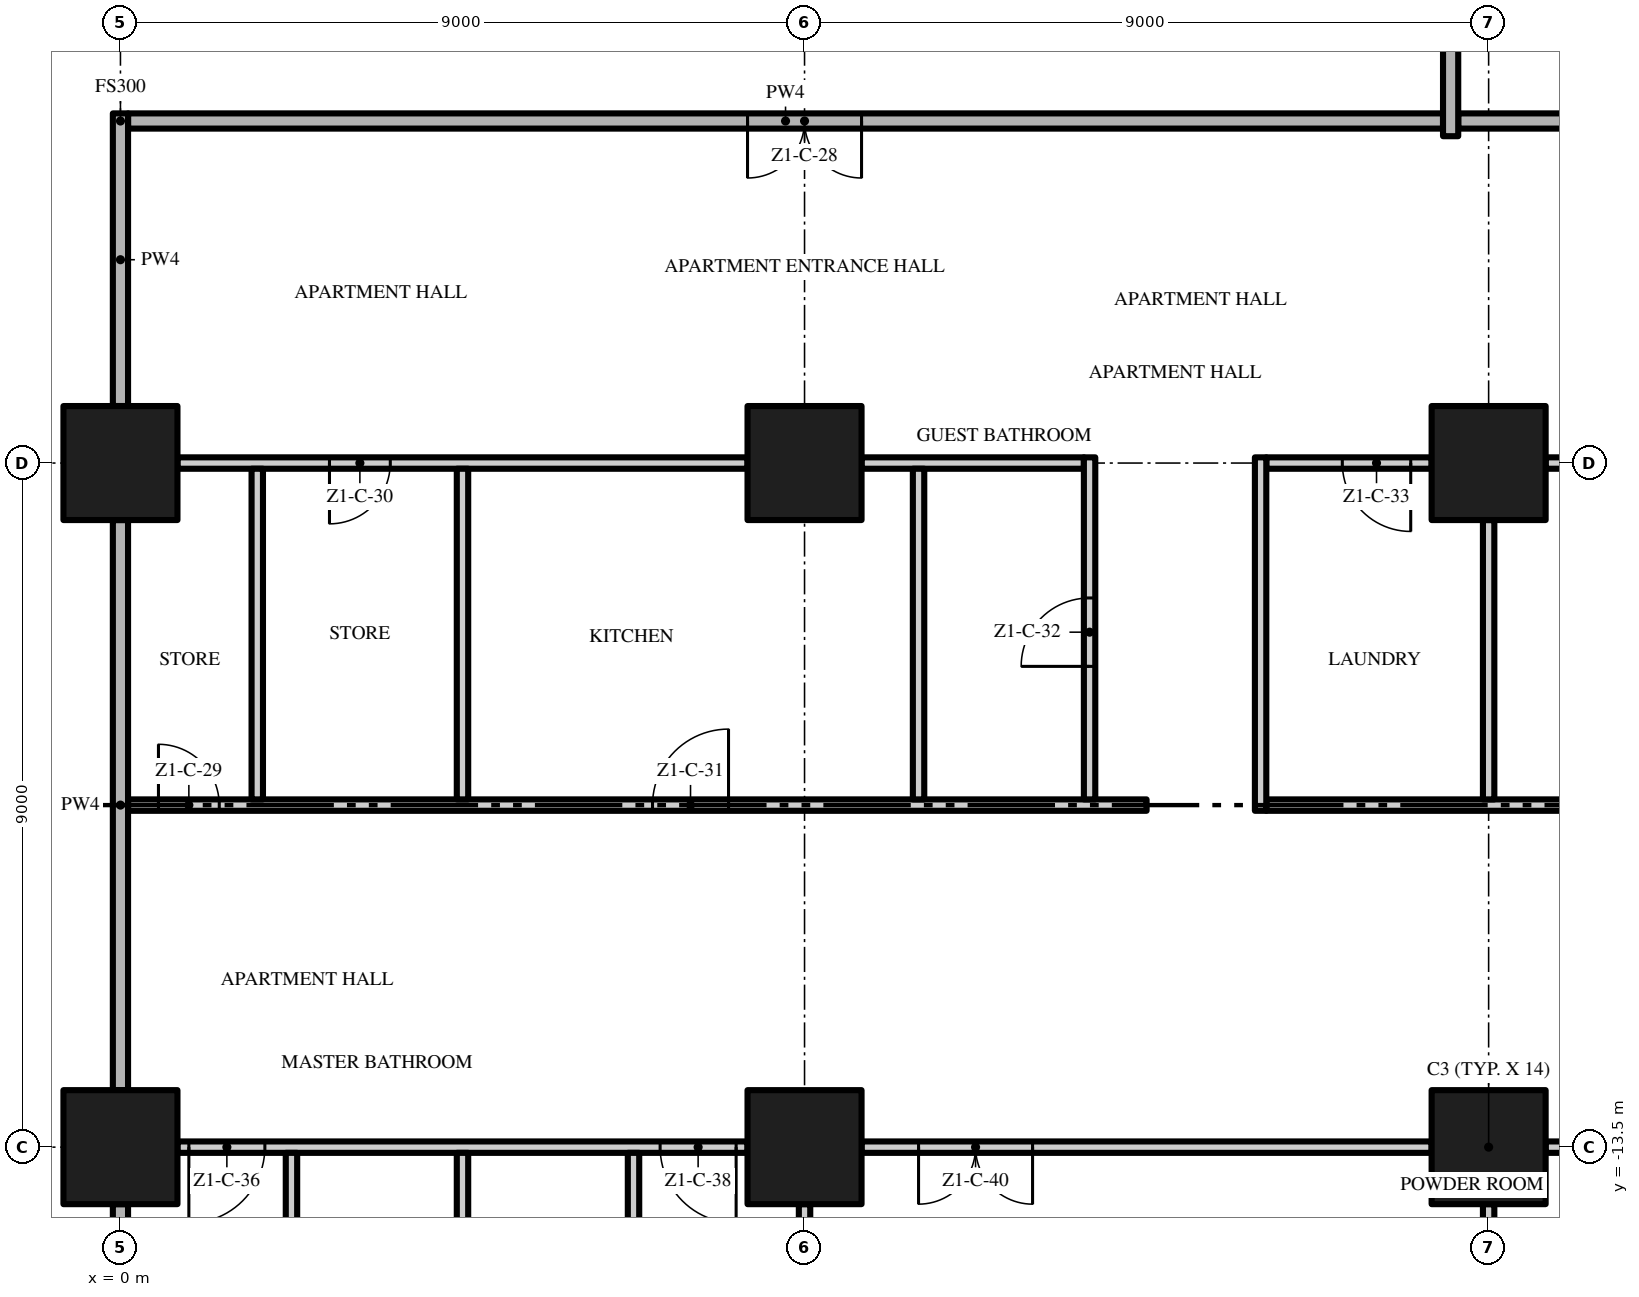
"""IFC4 building model, lengths in metres.
Left out: names, types, materials, properties, quantities, classifications, styles, units other than length and angle.
Written with IfcOpenShell. Run it as: python <this file> out.ifc"""

import sys

from ifc_helpers import new_model, si_unit, direction, frame, frame_2d, origin, origin_2d, place, context, subcontext, project, spatial, rectangle, extrude, element, fill, save


model = new_model("IFC4")
c1 = context("Model", 3, precision=1e-05, world=origin(), true_north=direction((0.0, 1.0)))
c2 = subcontext(c1, "Body", "Model", "MODEL_VIEW")
j1 = project(units=[si_unit("LENGTHUNIT", "METRE"), si_unit("PLANEANGLEUNIT", "RADIAN")], contexts=[c1])
p1 = place(None, origin())
s1 = spatial("IfcSite", under=j1, at=p1, CompositionType="ELEMENT")
p2 = place(p1, origin())
s2 = spatial("IfcBuilding", under=s1, at=p2, CompositionType="ELEMENT")
p3 = place(p2, frame((0.0, 0.0, 41.6)))
s3 = spatial("IfcBuildingStorey", under=s2, at=p3, CompositionType="ELEMENT", Elevation=41.6)
for number, where, z_axis, x_axis in (
    (1, (0.0, -13.5, 0.0), (0.0, 0.0, 1.0), (1.0, 0.0, 0.0)),
    (2, (0.0, -4.5, 0.0), (0.0, 0.0, 1.0), (1.0, 0.0, 0.0)),
    (3, (18.0, -13.5, 0.0), (0.0, 0.0, 1.0), (1.0, 0.0, 0.0)),
    (4, (18.0, -4.5, 0.0), (0.0, 0.0, 1.0), (1.0, 0.0, 0.0)),
    (5, (9.0, -13.5, 0.0), (0.0, 0.0, 1.0), (1.0, 0.0, 0.0)),
    (6, (9.0, -4.5, 0.0), (0.0, 0.0, 1.0), (1.0, 0.0, 0.0)),
):
    element("IfcColumn", number, at=place(p3, frame(where, z_axis=z_axis, x_axis=x_axis)), inside=s3, PredefinedType="COLUMN", context=c2, shape_type="SweptSolid", body=[
        extrude(rectangle(XDim=1.5, YDim=1.5, at=origin_2d()), origin(), (0.0, 0.0, 1.0), 3.5),
    ])
p4 = place(p3, frame((8.25, -13.5, 0.0), z_axis=(0.0, 0.0, 1.0), x_axis=(-1.0, 0.0, 0.0)))
e7 = element("IfcWall", 7, at=p4, inside=s3, PredefinedType="PARTITIONING", context=c2, shape_type="SweptSolid", body=[
    extrude(rectangle(XDim=7.5, YDim=0.15, at=frame_2d((3.75, 0.0))), origin(), (0.0, 0.0, 1.0), 3.5),
])
p5 = place(p4, frame((6.35, 0.0, 0.0)))
e8 = element("IfcOpeningElement", 8, at=p5, cuts=e7, PredefinedType="OPENING", context=c2, shape_type="SweptSolid", body=[
    extrude(rectangle(XDim=1.0, YDim=2.4, at=frame_2d((0.5, 1.2))), frame((0.0, 0.085, 0.0), z_axis=(0.0, -1.0, 0.0), x_axis=(1.0, 0.0, 0.0)), (0.0, 0.0, 1.0), 0.17),
])
p6 = place(p4, frame((0.15, 0.0, 0.0)))
e9 = element("IfcOpeningElement", 9, at=p6, cuts=e7, PredefinedType="OPENING", context=c2, shape_type="SweptSolid", body=[
    extrude(rectangle(XDim=1.0, YDim=2.4, at=frame_2d((0.5, 1.2))), frame((0.0, 0.085, 0.0), z_axis=(0.0, -1.0, 0.0), x_axis=(1.0, 0.0, 0.0)), (0.0, 0.0, 1.0), 0.17),
])
p7 = place(p3, frame((17.25, -13.5, 0.0), z_axis=(0.0, 0.0, 1.0), x_axis=(-1.0, 0.0, 0.0)))
e10 = element("IfcWall", 10, at=p7, inside=s3, PredefinedType="PARTITIONING", context=c2, shape_type="SweptSolid", body=[
    extrude(rectangle(XDim=7.5, YDim=0.15, at=frame_2d((3.75, 0.0))), origin(), (0.0, 0.0, 1.0), 3.5),
])
p8 = place(p7, frame((5.25, 0.0, 0.0)))
e11 = element("IfcOpeningElement", 11, at=p8, cuts=e10, PredefinedType="OPENING", context=c2, shape_type="SweptSolid", body=[
    extrude(rectangle(XDim=1.5, YDim=2.4, at=frame_2d((0.75, 1.2))), frame((0.0, 0.085, 0.0), z_axis=(0.0, -1.0, 0.0), x_axis=(1.0, 0.0, 0.0)), (0.0, 0.0, 1.0), 0.17),
])
p9 = place(p3, frame((25.6, -13.5, 0.0), z_axis=(0.0, 0.0, 1.0), x_axis=(-1.0, 0.0, 0.0)))
e12 = element("IfcWall", 12, at=p9, inside=s3, PredefinedType="PARTITIONING", context=c2, shape_type="SweptSolid", body=[
    extrude(rectangle(XDim=6.85, YDim=0.15, at=frame_2d((3.425, 0.0))), origin(), (0.0, 0.0, 1.0), 3.5),
])
p10 = place(p9, frame((1.1, 0.0, 0.0)))
e13 = element("IfcOpeningElement", 13, at=p10, cuts=e12, PredefinedType="OPENING", context=c2, shape_type="SweptSolid", body=[
    extrude(rectangle(XDim=1.8, YDim=2.4, at=frame_2d((0.9, 1.2))), frame((0.0, 0.085, 0.0), z_axis=(0.0, -1.0, 0.0), x_axis=(1.0, 0.0, 0.0)), (0.0, 0.0, 1.0), 0.17),
])
p11 = place(p3, frame((0.1, -9.0, 0.0), z_axis=(0.0, 0.0, 1.0), x_axis=(1.0, 0.0, 0.0)))
e14 = element("IfcWall", 14, at=p11, inside=s3, PredefinedType="PARTITIONING", context=c2, shape_type="SweptSolid", body=[
    extrude(rectangle(XDim=13.4, YDim=0.15, at=frame_2d((6.7, 0.0))), origin(), (0.0, 0.0, 1.0), 3.5),
])
p12 = place(p11, frame((0.4, 0.0, 0.0)))
e15 = element("IfcOpeningElement", 15, at=p12, cuts=e14, PredefinedType="OPENING", context=c2, shape_type="SweptSolid", body=[
    extrude(rectangle(XDim=0.8, YDim=2.0, at=frame_2d((0.4, 1.0))), frame((0.0, 0.085, 0.0), z_axis=(0.0, -1.0, 0.0), x_axis=(1.0, 0.0, 0.0)), (0.0, 0.0, 1.0), 0.17),
])
p13 = place(p11, frame((6.9, 0.0, 0.0)))
e16 = element("IfcOpeningElement", 16, at=p13, cuts=e14, PredefinedType="OPENING", context=c2, shape_type="SweptSolid", body=[
    extrude(rectangle(XDim=1.0, YDim=2.4, at=frame_2d((0.5, 1.2))), frame((0.0, 0.085, 0.0), z_axis=(0.0, -1.0, 0.0), x_axis=(1.0, 0.0, 0.0)), (0.0, 0.0, 1.0), 0.17),
])
p14 = place(p3, frame((15.075, -9.0, 0.0), z_axis=(0.0, 0.0, 1.0), x_axis=(1.0, 0.0, 0.0)))
e17 = element("IfcWall", 17, at=p14, inside=s3, PredefinedType="PARTITIONING", context=c2, shape_type="SweptSolid", body=[
    extrude(rectangle(XDim=11.625, YDim=0.15, at=frame_2d((5.812, 0.0))), origin(), (0.0, 0.0, 1.0), 3.5),
])
p15 = place(p3, frame((8.25, -4.5, 0.0), z_axis=(0.0, 0.0, 1.0), x_axis=(-1.0, 0.0, 0.0)))
e18 = element("IfcWall", 18, at=p15, inside=s3, PredefinedType="PARTITIONING", context=c2, shape_type="SweptSolid", body=[
    extrude(rectangle(XDim=7.5, YDim=0.15, at=frame_2d((3.75, 0.0))), origin(), (0.0, 0.0, 1.0), 3.5),
])
p16 = place(p15, frame((4.7, 0.0, 0.0)))
e19 = element("IfcOpeningElement", 19, at=p16, cuts=e18, PredefinedType="OPENING", context=c2, shape_type="SweptSolid", body=[
    extrude(rectangle(XDim=0.8, YDim=2.0, at=frame_2d((0.4, 1.0))), frame((0.0, 0.085, 0.0), z_axis=(0.0, -1.0, 0.0), x_axis=(1.0, 0.0, 0.0)), (0.0, 0.0, 1.0), 0.17),
])
p17 = place(p3, frame((9.75, -4.5, 0.0), z_axis=(0.0, 0.0, 1.0), x_axis=(1.0, 0.0, 0.0)))
e20 = element("IfcWall", 20, at=p17, inside=s3, PredefinedType="PARTITIONING", context=c2, shape_type="SweptSolid", body=[
    extrude(rectangle(XDim=2.925, YDim=0.15, at=frame_2d((1.462, 0.0))), origin(), (0.0, 0.0, 1.0), 3.5),
])
p18 = place(p3, frame((17.25, -4.5, 0.0), z_axis=(0.0, 0.0, 1.0), x_axis=(-1.0, 0.0, 0.0)))
e21 = element("IfcWall", 21, at=p18, inside=s3, PredefinedType="PARTITIONING", context=c2, shape_type="SweptSolid", body=[
    extrude(rectangle(XDim=2.175, YDim=0.15, at=frame_2d((1.087, 0.0))), origin(), (0.0, 0.0, 1.0), 3.5),
])
p19 = place(p18, frame((0.275, 0.0, 0.0)))
e22 = element("IfcOpeningElement", 22, at=p19, cuts=e21, PredefinedType="OPENING", context=c2, shape_type="SweptSolid", body=[
    extrude(rectangle(XDim=0.9, YDim=2.1, at=frame_2d((0.45, 1.05))), frame((0.0, 0.085, 0.0), z_axis=(0.0, -1.0, 0.0), x_axis=(1.0, 0.0, 0.0)), (0.0, 0.0, 1.0), 0.17),
])
p20 = place(p3, frame((25.6, -4.5, 0.0), z_axis=(0.0, 0.0, 1.0), x_axis=(-1.0, 0.0, 0.0)))
e23 = element("IfcWall", 23, at=p20, inside=s3, PredefinedType="PARTITIONING", context=c2, shape_type="SweptSolid", body=[
    extrude(rectangle(XDim=6.85, YDim=0.15, at=frame_2d((3.425, 0.0))), origin(), (0.0, 0.0, 1.0), 3.5),
])
p21 = place(p20, frame((4.55, 0.0, 0.0)))
e24 = element("IfcOpeningElement", 24, at=p21, cuts=e23, PredefinedType="OPENING", context=c2, shape_type="SweptSolid", body=[
    extrude(rectangle(XDim=0.9, YDim=2.1, at=frame_2d((0.45, 1.05))), frame((0.0, 0.085, 0.0), z_axis=(0.0, -1.0, 0.0), x_axis=(1.0, 0.0, 0.0)), (0.0, 0.0, 1.0), 0.17),
])
p22 = place(p3, frame((17.4, 0.0, 0.0), z_axis=(0.0, 0.0, 1.0), x_axis=(-1.0, 0.0, 0.0)))
e25 = element("IfcWall", 25, at=p22, inside=s3, PredefinedType="PARTITIONING", context=c2, shape_type="SweptSolid", body=[
    extrude(rectangle(XDim=17.3, YDim=0.2, at=frame_2d((8.65, 0.0))), origin(), (0.0, 0.0, 1.0), 3.5),
])
p23 = place(p22, frame((7.65, 0.0, 0.0)))
e26 = element("IfcOpeningElement", 26, at=p23, cuts=e25, PredefinedType="OPENING", context=c2, shape_type="SweptSolid", body=[
    extrude(rectangle(XDim=1.5, YDim=2.4, at=frame_2d((0.75, 1.2))), frame((0.0, 0.11, 0.0), z_axis=(0.0, -1.0, 0.0), x_axis=(1.0, 0.0, 0.0)), (0.0, 0.0, 1.0), 0.22),
])
p24 = place(p3, frame((17.6, 0.0, 0.0), z_axis=(0.0, 0.0, 1.0), x_axis=(1.0, 0.0, 0.0)))
e27 = element("IfcWall", 27, at=p24, inside=s3, PredefinedType="PARTITIONING", context=c2, shape_type="SweptSolid", body=[
    extrude(rectangle(XDim=9.1, YDim=0.2, at=frame_2d((4.55, 0.0))), origin(), (0.0, 0.0, 1.0), 3.5),
])
p25 = place(p3, frame((0.0, -21.1, 0.0), z_axis=(0.0, 0.0, 1.0), x_axis=(0.0, 1.0, 0.0)))
e28 = element("IfcWall", 28, at=p25, inside=s3, PredefinedType="PARTITIONING", context=c2, shape_type="SweptSolid", body=[
    extrude(rectangle(XDim=6.85, YDim=0.2, at=frame_2d((3.425, 0.0))), origin(), (0.0, 0.0, 1.0), 3.5),
])
p26 = place(p3, frame((0.0, -12.75, 0.0), z_axis=(0.0, 0.0, 1.0), x_axis=(0.0, 1.0, 0.0)))
e29 = element("IfcWall", 29, at=p26, inside=s3, PredefinedType="PARTITIONING", context=c2, shape_type="SweptSolid", body=[
    extrude(rectangle(XDim=7.5, YDim=0.2, at=frame_2d((3.75, 0.0))), origin(), (0.0, 0.0, 1.0), 3.5),
])
p27 = place(p3, frame((0.0, -3.75, 0.0), z_axis=(0.0, 0.0, 1.0), x_axis=(0.0, 1.0, 0.0)))
e30 = element("IfcWall", 30, at=p27, inside=s3, PredefinedType="PARTITIONING", context=c2, shape_type="SweptSolid", body=[
    extrude(rectangle(XDim=3.85, YDim=0.2, at=frame_2d((1.925, 0.0))), origin(), (0.0, 0.0, 1.0), 3.5),
])
p28 = place(p3, frame((1.8, -8.925, 0.0), z_axis=(0.0, 0.0, 1.0), x_axis=(0.0, 1.0, 0.0)))
e31 = element("IfcWall", 31, at=p28, inside=s3, PredefinedType="PARTITIONING", context=c2, shape_type="SweptSolid", body=[
    extrude(rectangle(XDim=4.35, YDim=0.15, at=frame_2d((2.175, 0.0))), origin(), (0.0, 0.0, 1.0), 3.5),
])
p29 = place(p3, frame((2.25, -16.575, 0.0), z_axis=(0.0, 0.0, 1.0), x_axis=(0.0, 1.0, 0.0)))
e32 = element("IfcWall", 32, at=p29, inside=s3, PredefinedType="PARTITIONING", context=c2, shape_type="SweptSolid", body=[
    extrude(rectangle(XDim=3.0, YDim=0.15, at=frame_2d((1.5, 0.0))), origin(), (0.0, 0.0, 1.0), 3.5),
])
p30 = place(p3, frame((4.5, -22.2, 0.0), z_axis=(0.0, 0.0, 1.0), x_axis=(0.0, 1.0, 0.0)))
e33 = element("IfcWall", 33, at=p30, inside=s3, PredefinedType="PARTITIONING", context=c2, shape_type="SweptSolid", body=[
    extrude(rectangle(XDim=8.625, YDim=0.15, at=frame_2d((4.312, 0.0))), origin(), (0.0, 0.0, 1.0), 3.5),
])
p31 = place(p3, frame((4.5, -8.925, 0.0), z_axis=(0.0, 0.0, 1.0), x_axis=(0.0, 1.0, 0.0)))
e34 = element("IfcWall", 34, at=p31, inside=s3, PredefinedType="PARTITIONING", context=c2, shape_type="SweptSolid", body=[
    extrude(rectangle(XDim=4.35, YDim=0.15, at=frame_2d((2.175, 0.0))), origin(), (0.0, 0.0, 1.0), 3.5),
])
p32 = place(p3, frame((6.75, -16.575, 0.0), z_axis=(0.0, 0.0, 1.0), x_axis=(0.0, 1.0, 0.0)))
e35 = element("IfcWall", 35, at=p32, inside=s3, PredefinedType="PARTITIONING", context=c2, shape_type="SweptSolid", body=[
    extrude(rectangle(XDim=3.0, YDim=0.15, at=frame_2d((1.5, 0.0))), origin(), (0.0, 0.0, 1.0), 3.5),
])
p33 = place(p3, frame((9.0, -21.1, 0.0), z_axis=(0.0, 0.0, 1.0), x_axis=(0.0, 1.0, 0.0)))
e36 = element("IfcWall", 36, at=p33, inside=s3, PredefinedType="PARTITIONING", context=c2, shape_type="SweptSolid", body=[
    extrude(rectangle(XDim=6.85, YDim=0.15, at=frame_2d((3.425, 0.0))), origin(), (0.0, 0.0, 1.0), 3.5),
])
p34 = place(p3, frame((10.5, -8.925, 0.0), z_axis=(0.0, 0.0, 1.0), x_axis=(0.0, 1.0, 0.0)))
e37 = element("IfcWall", 37, at=p34, inside=s3, PredefinedType="PARTITIONING", context=c2, shape_type="SweptSolid", body=[
    extrude(rectangle(XDim=4.35, YDim=0.15, at=frame_2d((2.175, 0.0))), origin(), (0.0, 0.0, 1.0), 3.5),
])
p35 = place(p3, frame((12.75, -8.925, 0.0), z_axis=(0.0, 0.0, 1.0), x_axis=(0.0, 1.0, 0.0)))
e38 = element("IfcWall", 38, at=p35, inside=s3, PredefinedType="PARTITIONING", context=c2, shape_type="SweptSolid", body=[
    extrude(rectangle(XDim=4.5, YDim=0.15, at=frame_2d((2.25, 0.0))), origin(), (0.0, 0.0, 1.0), 3.5),
])
p36 = place(p35, frame((1.75, 0.0, 0.0)))
e39 = element("IfcOpeningElement", 39, at=p36, cuts=e38, PredefinedType="OPENING", context=c2, shape_type="SweptSolid", body=[
    extrude(rectangle(XDim=0.9, YDim=2.1, at=frame_2d((0.45, 1.05))), frame((0.0, 0.085, 0.0), z_axis=(0.0, -1.0, 0.0), x_axis=(1.0, 0.0, 0.0)), (0.0, 0.0, 1.0), 0.17),
])
p37 = place(p3, frame((15.0, -9.075, 0.0), z_axis=(0.0, 0.0, 1.0), x_axis=(0.0, 1.0, 0.0)))
e40 = element("IfcWall", 40, at=p37, inside=s3, PredefinedType="PARTITIONING", context=c2, shape_type="SweptSolid", body=[
    extrude(rectangle(XDim=4.65, YDim=0.15, at=frame_2d((2.325, 0.0))), origin(), (0.0, 0.0, 1.0), 3.5),
])
p38 = place(p3, frame((17.5, -0.2, 0.0), z_axis=(0.0, 0.0, 1.0), x_axis=(0.0, 1.0, 0.0)))
e41 = element("IfcWall", 41, at=p38, inside=s3, PredefinedType="PARTITIONING", context=c2, shape_type="SweptSolid", body=[
    extrude(rectangle(XDim=3.95, YDim=0.2, at=frame_2d((1.975, 0.0))), origin(), (0.0, 0.0, 1.0), 3.5),
])
p39 = place(p3, frame((18.0, -21.1, 0.0), z_axis=(0.0, 0.0, 1.0), x_axis=(0.0, 1.0, 0.0)))
e42 = element("IfcWall", 42, at=p39, inside=s3, PredefinedType="PARTITIONING", context=c2, shape_type="SweptSolid", body=[
    extrude(rectangle(XDim=6.85, YDim=0.15, at=frame_2d((3.425, 0.0))), origin(), (0.0, 0.0, 1.0), 3.5),
])
p40 = place(p3, frame((18.0, -8.925, 0.0), z_axis=(0.0, 0.0, 1.0), x_axis=(0.0, 1.0, 0.0)))
e43 = element("IfcWall", 43, at=p40, inside=s3, PredefinedType="PARTITIONING", context=c2, shape_type="SweptSolid", body=[
    extrude(rectangle(XDim=3.675, YDim=0.15, at=frame_2d((1.837, 0.0))), origin(), (0.0, 0.0, 1.0), 3.5),
])
p41 = place(p23, origin())
e44 = element("IfcDoor", 44, at=p41, inside=s3, OperationType="DOUBLE_DOOR_SINGLE_SWING", PredefinedType="DOOR", context=c2, shape_type="SweptSolid", body=[
    extrude(rectangle(XDim=1.5, YDim=2.4, at=frame_2d((0.75, 1.2))), frame((0.0, 0.025, 0.0), z_axis=(0.0, -1.0, 0.0), x_axis=(1.0, 0.0, 0.0)), (0.0, 0.0, 1.0), 0.05),
])
fill(e26, e44)
p42 = place(p12, origin())
e45 = element("IfcDoor", 45, at=p42, inside=s3, OperationType="SINGLE_SWING_LEFT", PredefinedType="DOOR", context=c2, shape_type="SweptSolid", body=[
    extrude(rectangle(XDim=0.8, YDim=2.0, at=frame_2d((0.4, 1.0))), frame((0.0, 0.025, 0.0), z_axis=(0.0, -1.0, 0.0), x_axis=(1.0, 0.0, 0.0)), (0.0, 0.0, 1.0), 0.05),
])
fill(e15, e45)
p43 = place(p16, origin())
e46 = element("IfcDoor", 46, at=p43, inside=s3, OperationType="SINGLE_SWING_RIGHT", PredefinedType="DOOR", context=c2, shape_type="SweptSolid", body=[
    extrude(rectangle(XDim=0.8, YDim=2.0, at=frame_2d((0.4, 1.0))), frame((0.0, 0.025, 0.0), z_axis=(0.0, -1.0, 0.0), x_axis=(1.0, 0.0, 0.0)), (0.0, 0.0, 1.0), 0.05),
])
fill(e19, e46)
p44 = place(p13, origin())
e47 = element("IfcDoor", 47, at=p44, inside=s3, OperationType="SINGLE_SWING_RIGHT", PredefinedType="DOOR", context=c2, shape_type="SweptSolid", body=[
    extrude(rectangle(XDim=1.0, YDim=2.4, at=frame_2d((0.5, 1.2))), frame((0.0, 0.025, 0.0), z_axis=(0.0, -1.0, 0.0), x_axis=(1.0, 0.0, 0.0)), (0.0, 0.0, 1.0), 0.05),
])
fill(e16, e47)
p45 = place(p36, origin())
e48 = element("IfcDoor", 48, at=p45, inside=s3, OperationType="SINGLE_SWING_LEFT", PredefinedType="DOOR", context=c2, shape_type="SweptSolid", body=[
    extrude(rectangle(XDim=0.9, YDim=2.1, at=frame_2d((0.45, 1.05))), frame((0.0, 0.025, 0.0), z_axis=(0.0, -1.0, 0.0), x_axis=(1.0, 0.0, 0.0)), (0.0, 0.0, 1.0), 0.05),
])
fill(e39, e48)
p46 = place(p19, origin())
e49 = element("IfcDoor", 49, at=p46, inside=s3, OperationType="SINGLE_SWING_LEFT", PredefinedType="DOOR", context=c2, shape_type="SweptSolid", body=[
    extrude(rectangle(XDim=0.9, YDim=2.1, at=frame_2d((0.45, 1.05))), frame((0.0, 0.025, 0.0), z_axis=(0.0, -1.0, 0.0), x_axis=(1.0, 0.0, 0.0)), (0.0, 0.0, 1.0), 0.05),
])
fill(e22, e49)
p47 = place(p5, origin())
e50 = element("IfcDoor", 50, at=p47, inside=s3, OperationType="SINGLE_SWING_RIGHT", PredefinedType="DOOR", context=c2, shape_type="SweptSolid", body=[
    extrude(rectangle(XDim=1.0, YDim=2.4, at=frame_2d((0.5, 1.2))), frame((0.0, 0.025, 0.0), z_axis=(0.0, -1.0, 0.0), x_axis=(1.0, 0.0, 0.0)), (0.0, 0.0, 1.0), 0.05),
])
fill(e8, e50)
p48 = place(p6, origin())
e51 = element("IfcDoor", 51, at=p48, inside=s3, OperationType="SINGLE_SWING_LEFT", PredefinedType="DOOR", context=c2, shape_type="SweptSolid", body=[
    extrude(rectangle(XDim=1.0, YDim=2.4, at=frame_2d((0.5, 1.2))), frame((0.0, 0.025, 0.0), z_axis=(0.0, -1.0, 0.0), x_axis=(1.0, 0.0, 0.0)), (0.0, 0.0, 1.0), 0.05),
])
fill(e9, e51)
p49 = place(p8, origin())
e52 = element("IfcDoor", 52, at=p49, inside=s3, OperationType="DOUBLE_DOOR_SINGLE_SWING", PredefinedType="DOOR", context=c2, shape_type="SweptSolid", body=[
    extrude(rectangle(XDim=1.5, YDim=2.4, at=frame_2d((0.75, 1.2))), frame((0.0, 0.025, 0.0), z_axis=(0.0, -1.0, 0.0), x_axis=(1.0, 0.0, 0.0)), (0.0, 0.0, 1.0), 0.05),
])
fill(e11, e52)
save(model, sys.argv[1])
